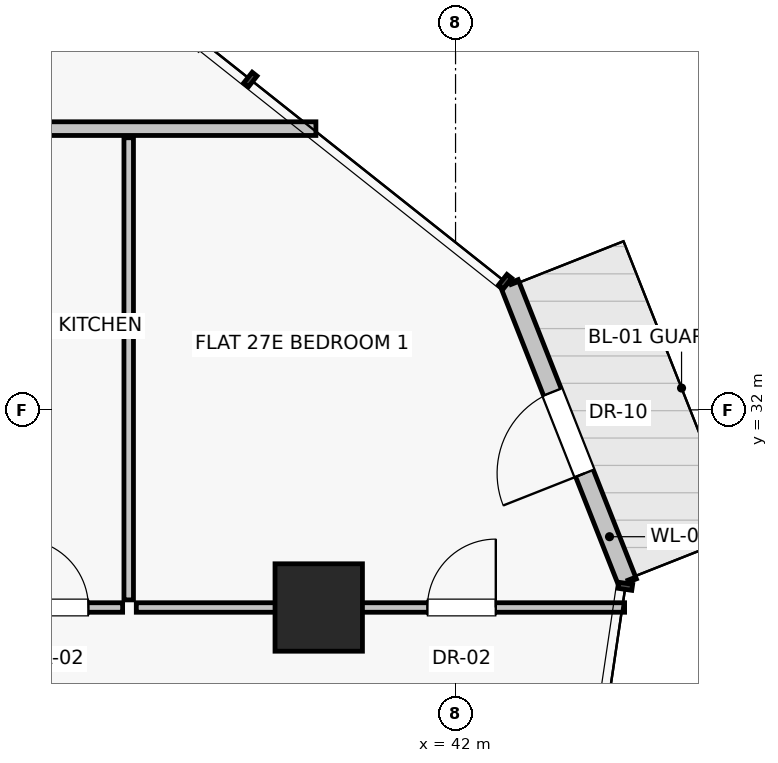
"""IFC4 building model, lengths in metres.
Left out: names, types, materials, properties, quantities, classifications, styles, units other than length and angle.
Written with IfcOpenShell. Run it as: python <this file> out.ifc"""

import sys

from ifc_helpers import new_model, si_unit, direction, frame, frame_2d, origin, origin_2d, place, context, subcontext, project, spatial, rectangle, extrude, source, transform, mapped, element, fill, save


model = new_model("IFC4")
c1 = context("Model", 3, precision=1e-05, world=origin(), true_north=direction((0.0, 1.0)))
c2 = subcontext(c1, "Body", "Model", "MODEL_VIEW")
j1 = project(units=[si_unit("LENGTHUNIT", "METRE"), si_unit("PLANEANGLEUNIT", "RADIAN")], contexts=[c1])
p1 = place(None, origin())
s1 = spatial("IfcSite", under=j1, at=p1, CompositionType="ELEMENT")
p2 = place(p1, origin())
s2 = spatial("IfcBuilding", under=s1, at=p2, CompositionType="ELEMENT")
p3 = place(p2, frame((0.0, 0.0, 99.2)))
s3 = spatial("IfcBuildingStorey", under=s2, at=p3, CompositionType="ELEMENT", Elevation=99.2)
p4 = place(p3, frame((40.2, 29.4, 0.0), z_axis=(0.0, 0.0, 1.0), x_axis=(1.0, 0.0, 0.0)))
e1 = element("IfcColumn", 1, at=p4, inside=s3, PredefinedType="COLUMN", context=c2, shape_type="SweptSolid", body=[
    extrude(rectangle(XDim=1.15, YDim=1.15, at=origin_2d()), origin(), (0.0, 0.0, 1.0), 3.25),
])
p5 = place(p3, frame((44.263, 29.73, 0.0), z_axis=(0.0, 0.0, 1.0), x_axis=(-0.367439648657, 0.930047366856, 0.0)))
e2 = element("IfcWall", 2, at=p5, inside=s3, PredefinedType="SOLIDWALL", context=c2, shape_type="SweptSolid", body=[
    extrude(rectangle(XDim=4.233, YDim=0.25, at=frame_2d((2.117, 0.0))), origin(), (0.0, 0.0, 1.0), 3.0),
])
p6 = place(p5, frame((1.542, 0.0, 0.0)))
e3 = element("IfcOpeningElement", 3, at=p6, cuts=e2, PredefinedType="OPENING", context=c2, shape_type="SweptSolid", body=[
    extrude(rectangle(XDim=1.15, YDim=2.25, at=frame_2d((0.575, 1.125))), frame((0.0, 0.135, 0.0), z_axis=(0.0, -1.0, 0.0), x_axis=(1.0, 0.0, 0.0)), (0.0, 0.0, 1.0), 0.27),
])
p7 = place(p3, frame((35.82, 35.7, 0.0), z_axis=(0.0, 0.0, 1.0), x_axis=(1.0, 0.0, 0.0)))
e4 = element("IfcWall", 4, at=p7, inside=s3, PredefinedType="PARTITIONING", context=c2, shape_type="SweptSolid", body=[
    extrude(rectangle(XDim=4.343, YDim=0.18, at=frame_2d((2.171, 0.0))), origin(), (0.0, 0.0, 1.0), 3.0),
])
p8 = place(p3, frame((35.82, 29.4, 0.0), z_axis=(0.0, 0.0, 1.0), x_axis=(1.0, 0.0, 0.0)))
e5 = element("IfcWall", 5, at=p8, inside=s3, PredefinedType="PARTITIONING", context=c2, shape_type="SweptSolid", body=[
    extrude(rectangle(XDim=1.8, YDim=0.125, at=frame_2d((0.9, 0.0))), origin(), (0.0, 0.0, 1.0), 2.378),
])
p9 = place(p8, frame((0.45, 0.0, 0.0)))
e6 = element("IfcOpeningElement", 6, at=p9, cuts=e5, PredefinedType="OPENING", context=c2, shape_type="SweptSolid", body=[
    extrude(rectangle(XDim=0.9, YDim=2.01, at=frame_2d((0.45, 1.005))), frame((0.0, 0.073, 0.0), z_axis=(0.0, -1.0, 0.0), x_axis=(1.0, 0.0, 0.0)), (0.0, 0.0, 1.0), 0.145),
])
p10 = place(p3, frame((37.7, 29.5, 0.0), z_axis=(0.0, 0.0, 1.0), x_axis=(0.0, 1.0, 0.0)))
e7 = element("IfcWall", 7, at=p10, inside=s3, PredefinedType="PARTITIONING", context=c2, shape_type="SweptSolid", body=[
    extrude(rectangle(XDim=6.08, YDim=0.125, at=frame_2d((3.04, 0.0))), origin(), (0.0, 0.0, 1.0), 3.0),
])
p11 = place(p3, frame((37.8, 29.4, 0.0), z_axis=(0.0, 0.0, 1.0), x_axis=(1.0, 0.0, 0.0)))
e8 = element("IfcWall", 8, at=p11, inside=s3, PredefinedType="PARTITIONING", context=c2, shape_type="SweptSolid", body=[
    extrude(rectangle(XDim=6.424, YDim=0.125, at=frame_2d((3.212, 0.0))), origin(), (0.0, 0.0, 1.0), 2.378),
])
p12 = place(p11, frame((3.83, 0.0, 0.0)))
e9 = element("IfcOpeningElement", 9, at=p12, cuts=e8, PredefinedType="OPENING", context=c2, shape_type="SweptSolid", body=[
    extrude(rectangle(XDim=0.9, YDim=2.01, at=frame_2d((0.45, 1.005))), frame((0.0, 0.073, 0.0), z_axis=(0.0, -1.0, 0.0), x_axis=(1.0, 0.0, 0.0)), (0.0, 0.0, 1.0), 0.145),
])
m1 = source(origin(), c2, "Body", "SweptSolid", [
    extrude(rectangle(XDim=1.15, YDim=2.25, at=frame_2d((0.575, 1.125))), frame((0.0, 0.025, 0.0), z_axis=(0.0, -1.0, 0.0), x_axis=(1.0, 0.0, 0.0)), (0.0, 0.0, 1.0), 0.05),
])
p13 = place(p6, frame((1.15, 0.0, 0.0), z_axis=(0.0, 0.0, 1.0), x_axis=(-1.0, 0.0, 0.0)))
e10 = element("IfcDoor", 10, at=p13, inside=s3, OperationType="SINGLE_SWING_LEFT", PredefinedType="DOOR", context=c2, shape_type="MappedRepresentation", body=[
    mapped(m1, transform((0.0, 0.0, 0.0), scale=1.0)),
])
fill(e3, e10)
m2 = source(origin(), c2, "Body", "SweptSolid", [
    extrude(rectangle(XDim=0.9, YDim=2.01, at=frame_2d((0.45, 1.005))), frame((0.0, 0.025, 0.0), z_axis=(0.0, -1.0, 0.0), x_axis=(1.0, 0.0, 0.0)), (0.0, 0.0, 1.0), 0.05),
])
p14 = place(p9, origin())
e11 = element("IfcDoor", 11, at=p14, inside=s3, OperationType="SINGLE_SWING_LEFT", PredefinedType="DOOR", context=c2, shape_type="MappedRepresentation", body=[
    mapped(m2, transform((0.0, 0.0, 0.0), scale=1.0)),
])
fill(e6, e11)
p15 = place(p12, origin())
e12 = element("IfcDoor", 12, at=p15, inside=s3, OperationType="SINGLE_SWING_RIGHT", PredefinedType="DOOR", context=c2, shape_type="MappedRepresentation", body=[
    mapped(m2, transform((0.0, 0.0, 0.0), scale=1.0)),
])
fill(e9, e12)
save(model, sys.argv[1])
